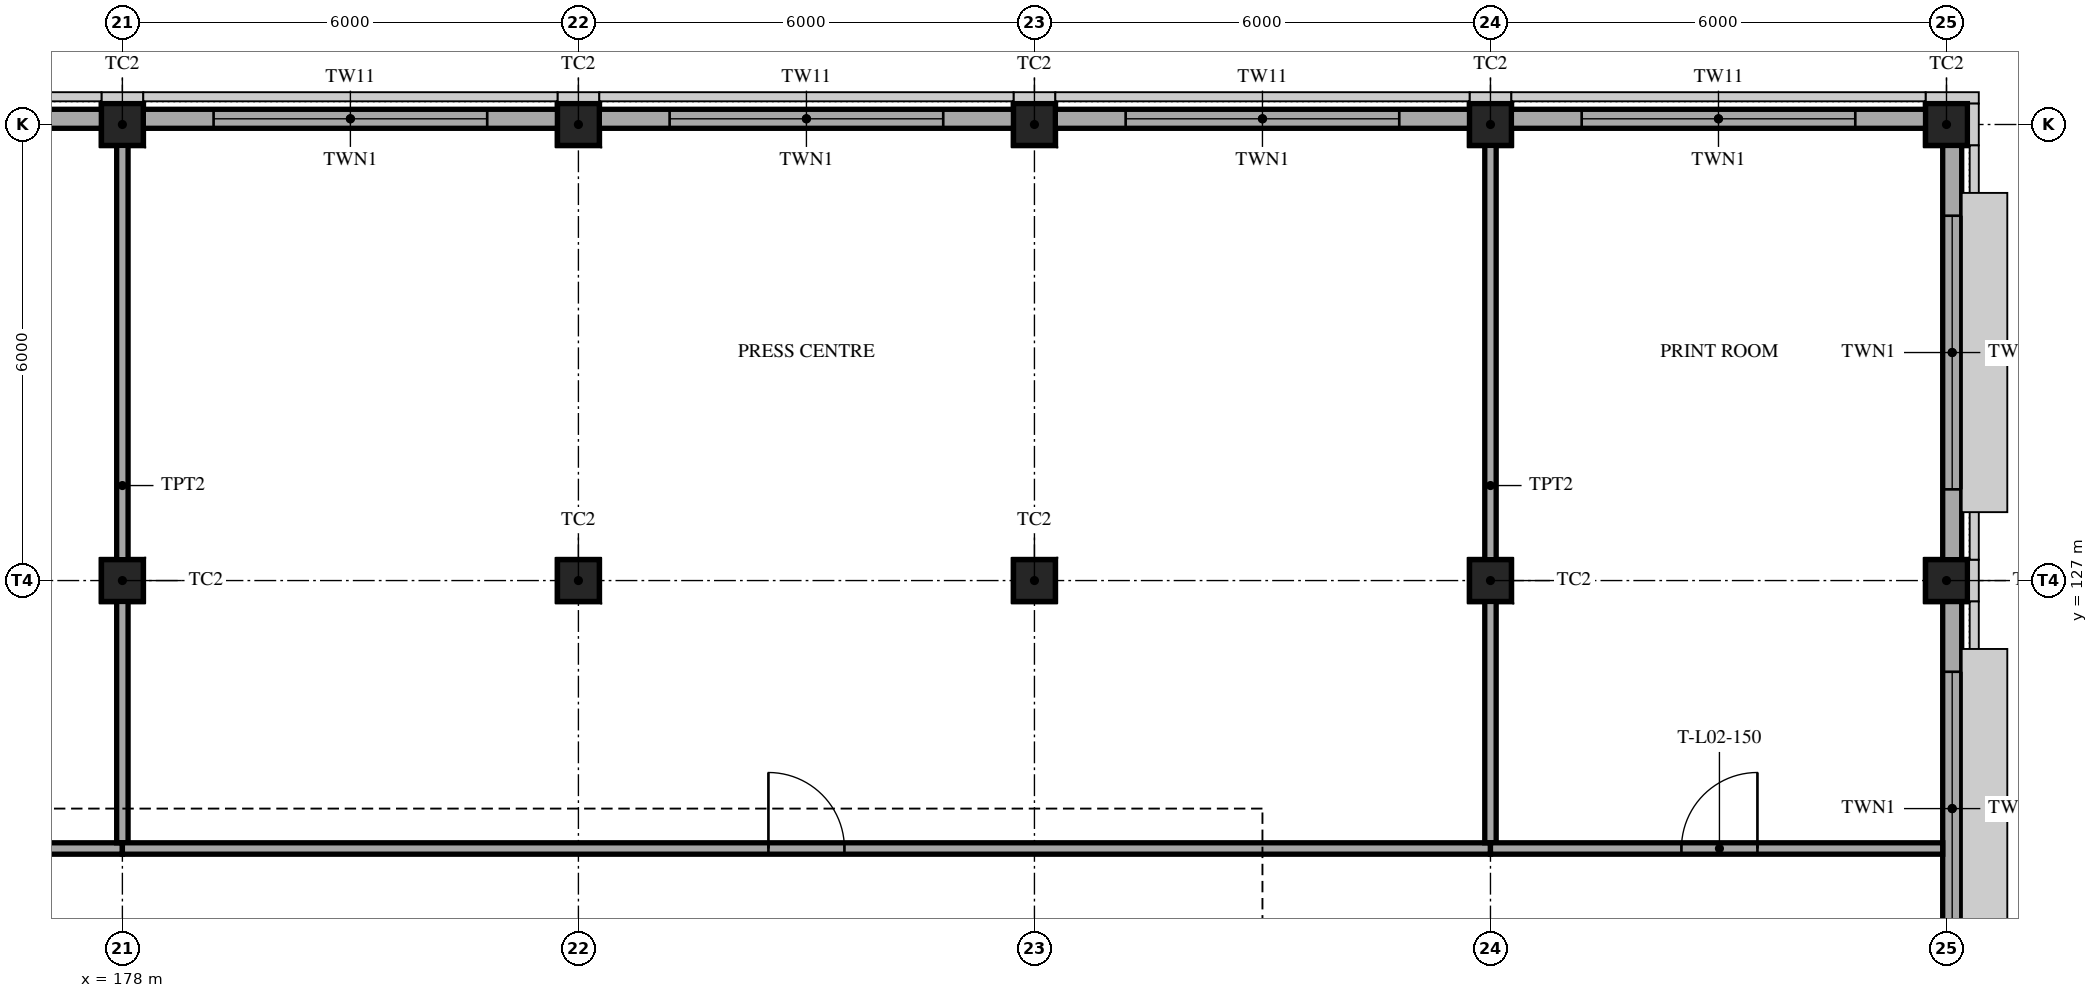
"""IFC4 building model, lengths in metres.
Left out: names, types, materials, properties, quantities, classifications, styles, units other than length and angle.
Written with IfcOpenShell. Run it as: python <this file> out.ifc"""

import sys

from ifc_helpers import new_model, si_unit, direction, frame, frame_2d, origin, origin_2d, place, context, subcontext, project, spatial, polyline, rectangle, hollow_rectangle, outline, extrude, element, fill, save


model = new_model("IFC4")
c1 = context("Model", 3, precision=1e-05, world=origin(), true_north=direction((0.0, 1.0)))
c2 = subcontext(c1, "Body", "Model", "MODEL_VIEW")
j1 = project(units=[si_unit("LENGTHUNIT", "METRE"), si_unit("PLANEANGLEUNIT", "RADIAN")], contexts=[c1])
p1 = place(None, origin())
s1 = spatial("IfcSite", under=j1, at=p1, CompositionType="ELEMENT")
p2 = place(p1, origin())
s2 = spatial("IfcBuilding", under=s1, at=p2, CompositionType="ELEMENT")
p3 = place(p2, frame((0.0, 0.0, 10.0)))
s3 = spatial("IfcBuildingStorey", under=s2, at=p3, CompositionType="ELEMENT", Elevation=10.0)
for number, where, z_axis, x_axis in (
    (1, (178.0, 133.0, 0.0), (0.0, 0.0, 1.0), (1.0, 0.0, 0.0)),
    (2, (184.0, 133.0, 0.0), (0.0, 0.0, 1.0), (1.0, 0.0, 0.0)),
    (3, (190.0, 133.0, 0.0), (0.0, 0.0, 1.0), (1.0, 0.0, 0.0)),
    (4, (196.0, 133.0, 0.0), (0.0, 0.0, 1.0), (1.0, 0.0, 0.0)),
    (5, (202.0, 127.0, 0.0), (0.0, 0.0, 1.0), (1.0, 0.0, 0.0)),
    (6, (202.0, 133.0, 0.0), (0.0, 0.0, 1.0), (1.0, 0.0, 0.0)),
    (7, (178.0, 127.0, 0.0), (0.0, 0.0, 1.0), (1.0, 0.0, 0.0)),
    (8, (184.0, 127.0, 0.0), (0.0, 0.0, 1.0), (1.0, 0.0, 0.0)),
    (9, (190.0, 127.0, 0.0), (0.0, 0.0, 1.0), (1.0, 0.0, 0.0)),
    (10, (196.0, 127.0, 0.0), (0.0, 0.0, 1.0), (1.0, 0.0, 0.0)),
):
    element("IfcColumn", number, at=place(p3, frame(where, z_axis=z_axis, x_axis=x_axis)), inside=s3, PredefinedType="COLUMN", context=c2, shape_type="SweptSolid", body=[
        extrude(hollow_rectangle(XDim=0.55, YDim=0.55, WallThickness=0.032, at=origin_2d()), origin(), (0.0, 0.0, 1.0), 5.0),
    ])
p4 = place(p3, frame((172.275, 133.075, 0.0), z_axis=(0.0, 0.0, 1.0), x_axis=(1.0, 0.0, 0.0)))
e11 = element("IfcWall", 11, at=p4, inside=s3, PredefinedType="SOLIDWALL", context=c2, shape_type="SweptSolid", body=[
    extrude(rectangle(XDim=5.45, YDim=0.25, at=frame_2d((2.725, 0.0))), origin(), (0.0, 0.0, 1.0), 4.35),
])
p5 = place(p4, frame((0.925, 0.0, 0.9)))
e12 = element("IfcOpeningElement", 12, at=p5, cuts=e11, PredefinedType="OPENING", context=c2, shape_type="SweptSolid", body=[
    extrude(rectangle(XDim=3.6, YDim=2.4, at=frame_2d((1.8, 1.2))), frame((0.0, 0.135, 0.0), z_axis=(0.0, -1.0, 0.0), x_axis=(1.0, 0.0, 0.0)), (0.0, 0.0, 1.0), 0.27),
])
p6 = place(p3, frame((178.275, 133.075, 0.0), z_axis=(0.0, 0.0, 1.0), x_axis=(1.0, 0.0, 0.0)))
e13 = element("IfcWall", 13, at=p6, inside=s3, PredefinedType="SOLIDWALL", context=c2, shape_type="SweptSolid", body=[
    extrude(rectangle(XDim=5.45, YDim=0.25, at=frame_2d((2.725, 0.0))), origin(), (0.0, 0.0, 1.0), 4.35),
])
p7 = place(p6, frame((0.925, 0.0, 0.9)))
e14 = element("IfcOpeningElement", 14, at=p7, cuts=e13, PredefinedType="OPENING", context=c2, shape_type="SweptSolid", body=[
    extrude(rectangle(XDim=3.6, YDim=2.4, at=frame_2d((1.8, 1.2))), frame((0.0, 0.135, 0.0), z_axis=(0.0, -1.0, 0.0), x_axis=(1.0, 0.0, 0.0)), (0.0, 0.0, 1.0), 0.27),
])
p8 = place(p3, frame((184.275, 133.075, 0.0), z_axis=(0.0, 0.0, 1.0), x_axis=(1.0, 0.0, 0.0)))
e15 = element("IfcWall", 15, at=p8, inside=s3, PredefinedType="SOLIDWALL", context=c2, shape_type="SweptSolid", body=[
    extrude(rectangle(XDim=5.45, YDim=0.25, at=frame_2d((2.725, 0.0))), origin(), (0.0, 0.0, 1.0), 4.35),
])
p9 = place(p8, frame((0.925, 0.0, 0.9)))
e16 = element("IfcOpeningElement", 16, at=p9, cuts=e15, PredefinedType="OPENING", context=c2, shape_type="SweptSolid", body=[
    extrude(rectangle(XDim=3.6, YDim=2.4, at=frame_2d((1.8, 1.2))), frame((0.0, 0.135, 0.0), z_axis=(0.0, -1.0, 0.0), x_axis=(1.0, 0.0, 0.0)), (0.0, 0.0, 1.0), 0.27),
])
p10 = place(p3, frame((190.275, 133.075, 0.0), z_axis=(0.0, 0.0, 1.0), x_axis=(1.0, 0.0, 0.0)))
e17 = element("IfcWall", 17, at=p10, inside=s3, PredefinedType="SOLIDWALL", context=c2, shape_type="SweptSolid", body=[
    extrude(rectangle(XDim=5.45, YDim=0.25, at=frame_2d((2.725, 0.0))), origin(), (0.0, 0.0, 1.0), 4.35),
])
p11 = place(p10, frame((0.925, 0.0, 0.9)))
e18 = element("IfcOpeningElement", 18, at=p11, cuts=e17, PredefinedType="OPENING", context=c2, shape_type="SweptSolid", body=[
    extrude(rectangle(XDim=3.6, YDim=2.4, at=frame_2d((1.8, 1.2))), frame((0.0, 0.135, 0.0), z_axis=(0.0, -1.0, 0.0), x_axis=(1.0, 0.0, 0.0)), (0.0, 0.0, 1.0), 0.27),
])
p12 = place(p3, frame((196.275, 133.075, 0.0), z_axis=(0.0, 0.0, 1.0), x_axis=(1.0, 0.0, 0.0)))
e19 = element("IfcWall", 19, at=p12, inside=s3, PredefinedType="SOLIDWALL", context=c2, shape_type="SweptSolid", body=[
    extrude(rectangle(XDim=5.45, YDim=0.25, at=frame_2d((2.725, 0.0))), origin(), (0.0, 0.0, 1.0), 4.35),
])
p13 = place(p12, frame((0.925, 0.0, 0.9)))
e20 = element("IfcOpeningElement", 20, at=p13, cuts=e19, PredefinedType="OPENING", context=c2, shape_type="SweptSolid", body=[
    extrude(rectangle(XDim=3.6, YDim=2.4, at=frame_2d((1.8, 1.2))), frame((0.0, 0.135, 0.0), z_axis=(0.0, -1.0, 0.0), x_axis=(1.0, 0.0, 0.0)), (0.0, 0.0, 1.0), 0.27),
])
p14 = place(p3, frame((202.075, 121.275, 0.0), z_axis=(0.0, 0.0, 1.0), x_axis=(0.0, 1.0, 0.0)))
e21 = element("IfcWall", 21, at=p14, inside=s3, PredefinedType="SOLIDWALL", context=c2, shape_type="SweptSolid", body=[
    extrude(rectangle(XDim=5.45, YDim=0.25, at=frame_2d((2.725, 0.0))), origin(), (0.0, 0.0, 1.0), 4.35),
])
p15 = place(p14, frame((0.925, 0.0, 0.9)))
e22 = element("IfcOpeningElement", 22, at=p15, cuts=e21, PredefinedType="OPENING", context=c2, shape_type="SweptSolid", body=[
    extrude(rectangle(XDim=3.6, YDim=2.4, at=frame_2d((1.8, 1.2))), frame((0.0, 0.135, 0.0), z_axis=(0.0, -1.0, 0.0), x_axis=(1.0, 0.0, 0.0)), (0.0, 0.0, 1.0), 0.27),
])
p16 = place(p3, frame((202.075, 127.275, 0.0), z_axis=(0.0, 0.0, 1.0), x_axis=(0.0, 1.0, 0.0)))
e23 = element("IfcWall", 23, at=p16, inside=s3, PredefinedType="SOLIDWALL", context=c2, shape_type="SweptSolid", body=[
    extrude(rectangle(XDim=5.45, YDim=0.25, at=frame_2d((2.725, 0.0))), origin(), (0.0, 0.0, 1.0), 4.35),
])
p17 = place(p16, frame((0.925, 0.0, 0.9)))
e24 = element("IfcOpeningElement", 24, at=p17, cuts=e23, PredefinedType="OPENING", context=c2, shape_type="SweptSolid", body=[
    extrude(rectangle(XDim=3.6, YDim=2.4, at=frame_2d((1.8, 1.2))), frame((0.0, 0.135, 0.0), z_axis=(0.0, -1.0, 0.0), x_axis=(1.0, 0.0, 0.0)), (0.0, 0.0, 1.0), 0.27),
])
p18 = place(p3, frame((160.05, 123.475, 0.0), z_axis=(0.0, 0.0, 1.0), x_axis=(1.0, 0.0, 0.0)))
e25 = element("IfcWall", 25, at=p18, inside=s3, PredefinedType="PARTITIONING", context=c2, shape_type="SweptSolid", body=[
    extrude(rectangle(XDim=17.95, YDim=0.15, at=frame_2d((8.975, 0.0))), origin(), (0.0, 0.0, 1.0), 4.2),
])
p19 = place(p18, frame((8.438, 0.0, 0.0)))
e26 = element("IfcOpeningElement", 26, at=p19, cuts=e25, PredefinedType="OPENING", context=c2, shape_type="SweptSolid", body=[
    extrude(rectangle(XDim=1.0, YDim=2.1, at=frame_2d((0.5, 1.05))), frame((0.0, 0.085, 0.0), z_axis=(0.0, -1.0, 0.0), x_axis=(1.0, 0.0, 0.0)), (0.0, 0.0, 1.0), 0.17),
])
p20 = place(p3, frame((178.0, 123.55, 0.0), z_axis=(0.0, 0.0, 1.0), x_axis=(0.0, 1.0, 0.0)))
e27 = element("IfcWall", 27, at=p20, inside=s3, PredefinedType="PARTITIONING", context=c2, shape_type="SweptSolid", body=[
    extrude(rectangle(XDim=9.4, YDim=0.15, at=frame_2d((4.7, 0.0))), origin(), (0.0, 0.0, 1.0), 4.2),
])
p21 = place(p3, frame((178.0, 123.475, 0.0), z_axis=(0.0, 0.0, 1.0), x_axis=(1.0, 0.0, 0.0)))
e28 = element("IfcWall", 28, at=p21, inside=s3, PredefinedType="PARTITIONING", context=c2, shape_type="SweptSolid", body=[
    extrude(rectangle(XDim=18.0, YDim=0.15, at=frame_2d((9.0, 0.0))), origin(), (0.0, 0.0, 1.0), 4.2),
])
p22 = place(p21, frame((8.5, 0.0, 0.0)))
e29 = element("IfcOpeningElement", 29, at=p22, cuts=e28, PredefinedType="OPENING", context=c2, shape_type="SweptSolid", body=[
    extrude(rectangle(XDim=1.0, YDim=2.1, at=frame_2d((0.5, 1.05))), frame((0.0, 0.085, 0.0), z_axis=(0.0, -1.0, 0.0), x_axis=(1.0, 0.0, 0.0)), (0.0, 0.0, 1.0), 0.17),
])
p23 = place(p3, frame((196.0, 123.55, 0.0), z_axis=(0.0, 0.0, 1.0), x_axis=(0.0, 1.0, 0.0)))
e30 = element("IfcWall", 30, at=p23, inside=s3, PredefinedType="PARTITIONING", context=c2, shape_type="SweptSolid", body=[
    extrude(rectangle(XDim=9.4, YDim=0.15, at=frame_2d((4.7, 0.0))), origin(), (0.0, 0.0, 1.0), 4.2),
])
p24 = place(p3, frame((196.0, 123.475, 0.0), z_axis=(0.0, 0.0, 1.0), x_axis=(1.0, 0.0, 0.0)))
e31 = element("IfcWall", 31, at=p24, inside=s3, PredefinedType="PARTITIONING", context=c2, shape_type="SweptSolid", body=[
    extrude(rectangle(XDim=5.95, YDim=0.15, at=frame_2d((2.975, 0.0))), origin(), (0.0, 0.0, 1.0), 4.2),
])
p25 = place(p24, frame((2.512, 0.0, 0.0)))
e32 = element("IfcOpeningElement", 32, at=p25, cuts=e31, PredefinedType="OPENING", context=c2, shape_type="SweptSolid", body=[
    extrude(rectangle(XDim=1.0, YDim=2.1, at=frame_2d((0.5, 1.05))), frame((0.0, 0.085, 0.0), z_axis=(0.0, -1.0, 0.0), x_axis=(1.0, 0.0, 0.0)), (0.0, 0.0, 1.0), 0.17),
])
p26 = place(p7, origin())
e33 = element("IfcWindow", 33, at=p26, inside=s3, PartitioningType="TRIPLE_PANEL_VERTICAL", PredefinedType="WINDOW", context=c2, shape_type="SweptSolid", body=[
    extrude(outline(polyline([(0.0, 0.0), (3.6, 0.0), (3.6, 2.4), (0.0, 2.4), (0.0, 0.0)]), holes=[polyline([(0.06, 0.06), (0.96, 0.06), (0.96, 2.34), (0.06, 2.34), (0.06, 0.06)]), polyline([(1.06, 0.06), (2.54, 0.06), (2.54, 2.34), (1.06, 2.34), (1.06, 0.06)]), polyline([(2.64, 0.06), (3.54, 0.06), (3.54, 2.34), (2.64, 2.34), (2.64, 0.06)])]), frame((0.0, 0.03, 0.0), z_axis=(0.0, -1.0, 0.0), x_axis=(1.0, 0.0, 0.0)), (0.0, 0.0, 1.0), 0.06),
    extrude(rectangle(XDim=0.924, YDim=2.304, at=frame_2d((0.51, 1.2))), frame((0.0, 0.01, 0.0), z_axis=(0.0, -1.0, 0.0), x_axis=(1.0, 0.0, 0.0)), (0.0, 0.0, 1.0), 0.02),
    extrude(rectangle(XDim=1.504, YDim=2.304, at=frame_2d((1.8, 1.2))), frame((0.0, 0.01, 0.0), z_axis=(0.0, -1.0, 0.0), x_axis=(1.0, 0.0, 0.0)), (0.0, 0.0, 1.0), 0.02),
    extrude(rectangle(XDim=0.924, YDim=2.304, at=frame_2d((3.09, 1.2))), frame((0.0, 0.01, 0.0), z_axis=(0.0, -1.0, 0.0), x_axis=(1.0, 0.0, 0.0)), (0.0, 0.0, 1.0), 0.02),
])
fill(e14, e33)
p27 = place(p9, origin())
e34 = element("IfcWindow", 34, at=p27, inside=s3, PartitioningType="TRIPLE_PANEL_VERTICAL", PredefinedType="WINDOW", context=c2, shape_type="SweptSolid", body=[
    extrude(outline(polyline([(0.0, 0.0), (3.6, 0.0), (3.6, 2.4), (0.0, 2.4), (0.0, 0.0)]), holes=[polyline([(0.06, 0.06), (0.96, 0.06), (0.96, 2.34), (0.06, 2.34), (0.06, 0.06)]), polyline([(1.06, 0.06), (2.54, 0.06), (2.54, 2.34), (1.06, 2.34), (1.06, 0.06)]), polyline([(2.64, 0.06), (3.54, 0.06), (3.54, 2.34), (2.64, 2.34), (2.64, 0.06)])]), frame((0.0, 0.03, 0.0), z_axis=(0.0, -1.0, 0.0), x_axis=(1.0, 0.0, 0.0)), (0.0, 0.0, 1.0), 0.06),
    extrude(rectangle(XDim=0.924, YDim=2.304, at=frame_2d((0.51, 1.2))), frame((0.0, 0.01, 0.0), z_axis=(0.0, -1.0, 0.0), x_axis=(1.0, 0.0, 0.0)), (0.0, 0.0, 1.0), 0.02),
    extrude(rectangle(XDim=1.504, YDim=2.304, at=frame_2d((1.8, 1.2))), frame((0.0, 0.01, 0.0), z_axis=(0.0, -1.0, 0.0), x_axis=(1.0, 0.0, 0.0)), (0.0, 0.0, 1.0), 0.02),
    extrude(rectangle(XDim=0.924, YDim=2.304, at=frame_2d((3.09, 1.2))), frame((0.0, 0.01, 0.0), z_axis=(0.0, -1.0, 0.0), x_axis=(1.0, 0.0, 0.0)), (0.0, 0.0, 1.0), 0.02),
])
fill(e16, e34)
p28 = place(p11, origin())
e35 = element("IfcWindow", 35, at=p28, inside=s3, PartitioningType="TRIPLE_PANEL_VERTICAL", PredefinedType="WINDOW", context=c2, shape_type="SweptSolid", body=[
    extrude(outline(polyline([(0.0, 0.0), (3.6, 0.0), (3.6, 2.4), (0.0, 2.4), (0.0, 0.0)]), holes=[polyline([(0.06, 0.06), (0.96, 0.06), (0.96, 2.34), (0.06, 2.34), (0.06, 0.06)]), polyline([(1.06, 0.06), (2.54, 0.06), (2.54, 2.34), (1.06, 2.34), (1.06, 0.06)]), polyline([(2.64, 0.06), (3.54, 0.06), (3.54, 2.34), (2.64, 2.34), (2.64, 0.06)])]), frame((0.0, 0.03, 0.0), z_axis=(0.0, -1.0, 0.0), x_axis=(1.0, 0.0, 0.0)), (0.0, 0.0, 1.0), 0.06),
    extrude(rectangle(XDim=0.924, YDim=2.304, at=frame_2d((0.51, 1.2))), frame((0.0, 0.01, 0.0), z_axis=(0.0, -1.0, 0.0), x_axis=(1.0, 0.0, 0.0)), (0.0, 0.0, 1.0), 0.02),
    extrude(rectangle(XDim=1.504, YDim=2.304, at=frame_2d((1.8, 1.2))), frame((0.0, 0.01, 0.0), z_axis=(0.0, -1.0, 0.0), x_axis=(1.0, 0.0, 0.0)), (0.0, 0.0, 1.0), 0.02),
    extrude(rectangle(XDim=0.924, YDim=2.304, at=frame_2d((3.09, 1.2))), frame((0.0, 0.01, 0.0), z_axis=(0.0, -1.0, 0.0), x_axis=(1.0, 0.0, 0.0)), (0.0, 0.0, 1.0), 0.02),
])
fill(e18, e35)
p29 = place(p13, origin())
e36 = element("IfcWindow", 36, at=p29, inside=s3, PartitioningType="TRIPLE_PANEL_VERTICAL", PredefinedType="WINDOW", context=c2, shape_type="SweptSolid", body=[
    extrude(outline(polyline([(0.0, 0.0), (3.6, 0.0), (3.6, 2.4), (0.0, 2.4), (0.0, 0.0)]), holes=[polyline([(0.06, 0.06), (0.96, 0.06), (0.96, 2.34), (0.06, 2.34), (0.06, 0.06)]), polyline([(1.06, 0.06), (2.54, 0.06), (2.54, 2.34), (1.06, 2.34), (1.06, 0.06)]), polyline([(2.64, 0.06), (3.54, 0.06), (3.54, 2.34), (2.64, 2.34), (2.64, 0.06)])]), frame((0.0, 0.03, 0.0), z_axis=(0.0, -1.0, 0.0), x_axis=(1.0, 0.0, 0.0)), (0.0, 0.0, 1.0), 0.06),
    extrude(rectangle(XDim=0.924, YDim=2.304, at=frame_2d((0.51, 1.2))), frame((0.0, 0.01, 0.0), z_axis=(0.0, -1.0, 0.0), x_axis=(1.0, 0.0, 0.0)), (0.0, 0.0, 1.0), 0.02),
    extrude(rectangle(XDim=1.504, YDim=2.304, at=frame_2d((1.8, 1.2))), frame((0.0, 0.01, 0.0), z_axis=(0.0, -1.0, 0.0), x_axis=(1.0, 0.0, 0.0)), (0.0, 0.0, 1.0), 0.02),
    extrude(rectangle(XDim=0.924, YDim=2.304, at=frame_2d((3.09, 1.2))), frame((0.0, 0.01, 0.0), z_axis=(0.0, -1.0, 0.0), x_axis=(1.0, 0.0, 0.0)), (0.0, 0.0, 1.0), 0.02),
])
fill(e20, e36)
p30 = place(p15, origin())
e37 = element("IfcWindow", 37, at=p30, inside=s3, PartitioningType="TRIPLE_PANEL_VERTICAL", PredefinedType="WINDOW", context=c2, shape_type="SweptSolid", body=[
    extrude(outline(polyline([(0.0, 0.0), (3.6, 0.0), (3.6, 2.4), (0.0, 2.4), (0.0, 0.0)]), holes=[polyline([(0.06, 0.06), (0.96, 0.06), (0.96, 2.34), (0.06, 2.34), (0.06, 0.06)]), polyline([(1.06, 0.06), (2.54, 0.06), (2.54, 2.34), (1.06, 2.34), (1.06, 0.06)]), polyline([(2.64, 0.06), (3.54, 0.06), (3.54, 2.34), (2.64, 2.34), (2.64, 0.06)])]), frame((0.0, 0.03, 0.0), z_axis=(0.0, -1.0, 0.0), x_axis=(1.0, 0.0, 0.0)), (0.0, 0.0, 1.0), 0.06),
    extrude(rectangle(XDim=0.924, YDim=2.304, at=frame_2d((0.51, 1.2))), frame((0.0, 0.01, 0.0), z_axis=(0.0, -1.0, 0.0), x_axis=(1.0, 0.0, 0.0)), (0.0, 0.0, 1.0), 0.02),
    extrude(rectangle(XDim=1.504, YDim=2.304, at=frame_2d((1.8, 1.2))), frame((0.0, 0.01, 0.0), z_axis=(0.0, -1.0, 0.0), x_axis=(1.0, 0.0, 0.0)), (0.0, 0.0, 1.0), 0.02),
    extrude(rectangle(XDim=0.924, YDim=2.304, at=frame_2d((3.09, 1.2))), frame((0.0, 0.01, 0.0), z_axis=(0.0, -1.0, 0.0), x_axis=(1.0, 0.0, 0.0)), (0.0, 0.0, 1.0), 0.02),
])
fill(e22, e37)
p31 = place(p17, origin())
e38 = element("IfcWindow", 38, at=p31, inside=s3, PartitioningType="TRIPLE_PANEL_VERTICAL", PredefinedType="WINDOW", context=c2, shape_type="SweptSolid", body=[
    extrude(outline(polyline([(0.0, 0.0), (3.6, 0.0), (3.6, 2.4), (0.0, 2.4), (0.0, 0.0)]), holes=[polyline([(0.06, 0.06), (0.96, 0.06), (0.96, 2.34), (0.06, 2.34), (0.06, 0.06)]), polyline([(1.06, 0.06), (2.54, 0.06), (2.54, 2.34), (1.06, 2.34), (1.06, 0.06)]), polyline([(2.64, 0.06), (3.54, 0.06), (3.54, 2.34), (2.64, 2.34), (2.64, 0.06)])]), frame((0.0, 0.03, 0.0), z_axis=(0.0, -1.0, 0.0), x_axis=(1.0, 0.0, 0.0)), (0.0, 0.0, 1.0), 0.06),
    extrude(rectangle(XDim=0.924, YDim=2.304, at=frame_2d((0.51, 1.2))), frame((0.0, 0.01, 0.0), z_axis=(0.0, -1.0, 0.0), x_axis=(1.0, 0.0, 0.0)), (0.0, 0.0, 1.0), 0.02),
    extrude(rectangle(XDim=1.504, YDim=2.304, at=frame_2d((1.8, 1.2))), frame((0.0, 0.01, 0.0), z_axis=(0.0, -1.0, 0.0), x_axis=(1.0, 0.0, 0.0)), (0.0, 0.0, 1.0), 0.02),
    extrude(rectangle(XDim=0.924, YDim=2.304, at=frame_2d((3.09, 1.2))), frame((0.0, 0.01, 0.0), z_axis=(0.0, -1.0, 0.0), x_axis=(1.0, 0.0, 0.0)), (0.0, 0.0, 1.0), 0.02),
])
fill(e24, e38)
p32 = place(p22, origin())
e39 = element("IfcDoor", 39, at=p32, inside=s3, OperationType="SINGLE_SWING_LEFT", PredefinedType="DOOR", context=c2, shape_type="SweptSolid", body=[
    extrude(rectangle(XDim=1.0, YDim=2.1, at=frame_2d((0.5, 1.05))), frame((0.0, 0.025, 0.0), z_axis=(0.0, -1.0, 0.0), x_axis=(1.0, 0.0, 0.0)), (0.0, 0.0, 1.0), 0.05),
])
fill(e29, e39)
p33 = place(p25, origin())
e40 = element("IfcDoor", 40, at=p33, inside=s3, OperationType="SINGLE_SWING_RIGHT", PredefinedType="DOOR", context=c2, shape_type="SweptSolid", body=[
    extrude(rectangle(XDim=1.0, YDim=2.1, at=frame_2d((0.5, 1.05))), frame((0.0, 0.025, 0.0), z_axis=(0.0, -1.0, 0.0), x_axis=(1.0, 0.0, 0.0)), (0.0, 0.0, 1.0), 0.05),
])
fill(e32, e40)
save(model, sys.argv[1])
